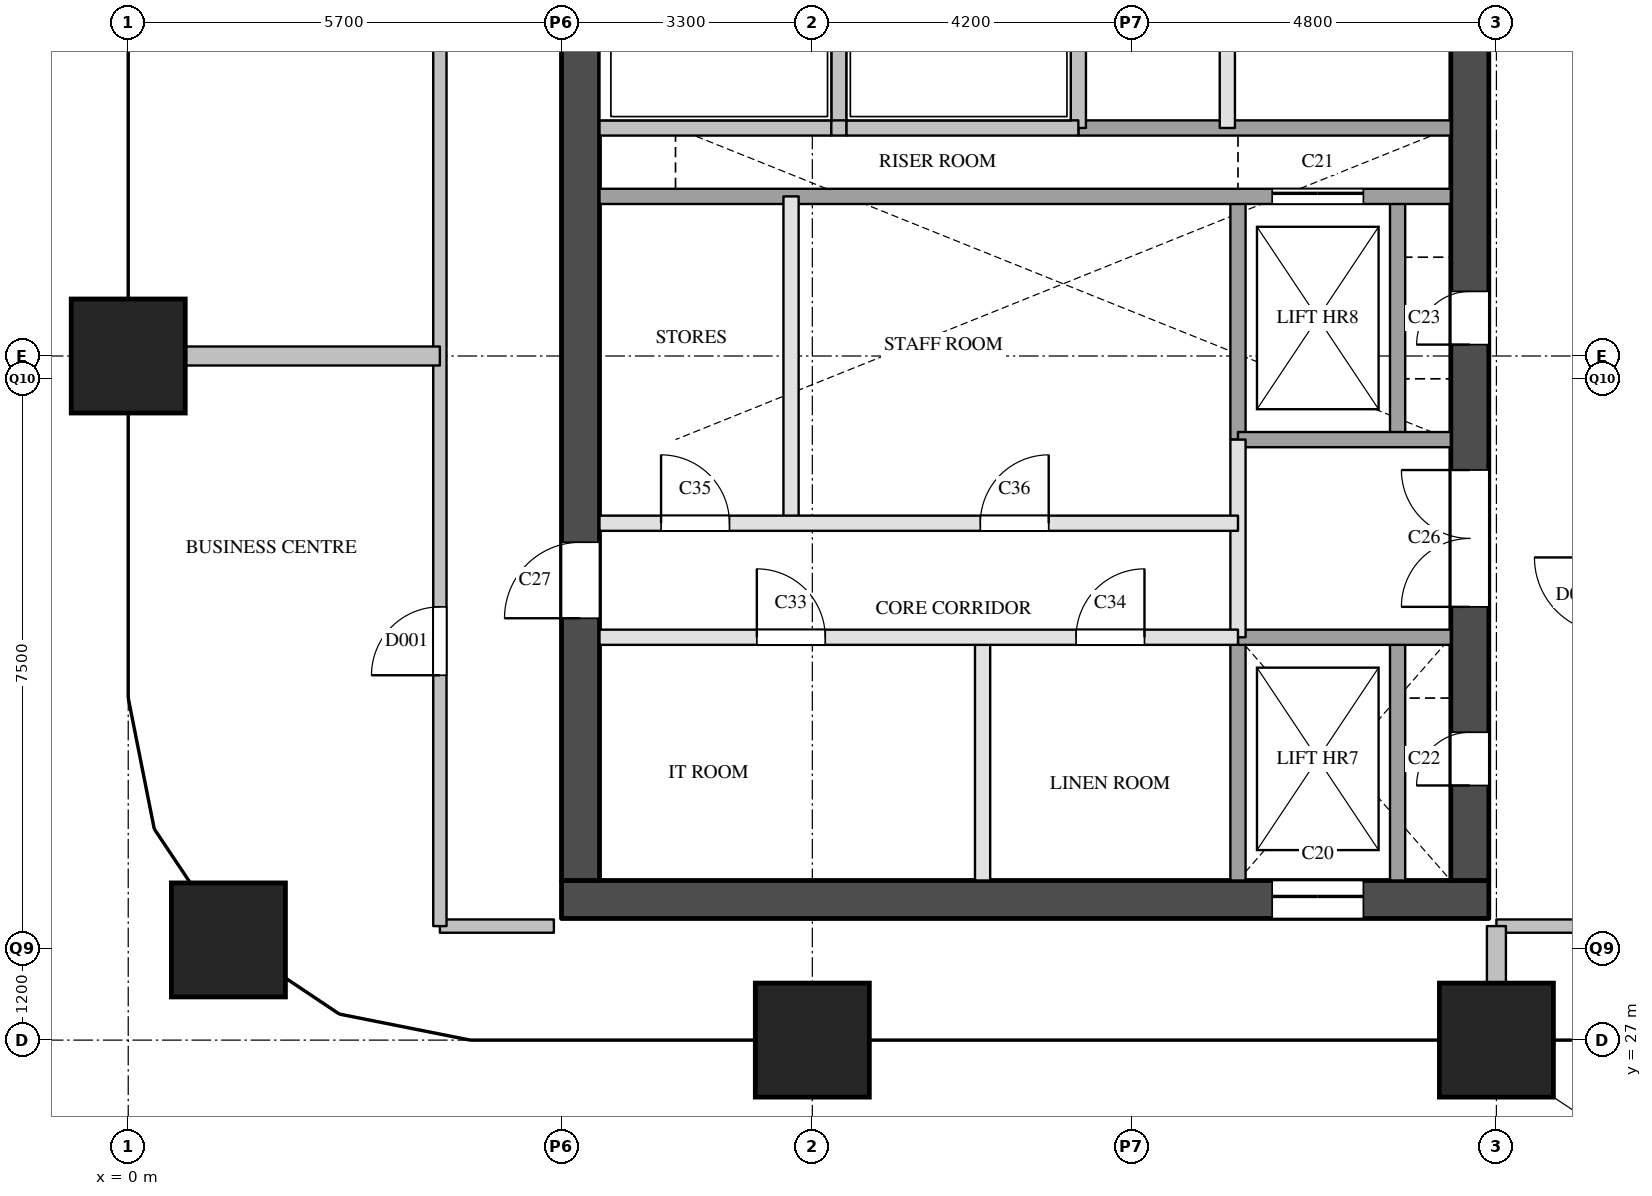
"""IFC4 building model, lengths in metres.
Left out: names, types, materials, properties, quantities, classifications, styles, units other than length and angle.
Written with IfcOpenShell. Run it as: python <this file> out.ifc"""

import sys

from ifc_helpers import new_model, si_unit, direction, frame, frame_2d, origin, origin_2d, place, context, subcontext, project, spatial, rectangle, extrude, element, fill, save


model = new_model("IFC4")
c1 = context("Model", 3, precision=1e-05, world=origin(), true_north=direction((0.0, 1.0)))
c2 = subcontext(c1, "Body", "Model", "MODEL_VIEW")
j1 = project(units=[si_unit("LENGTHUNIT", "METRE"), si_unit("PLANEANGLEUNIT", "RADIAN")], contexts=[c1])
p1 = place(None, origin())
s1 = spatial("IfcSite", under=j1, at=p1, CompositionType="ELEMENT")
p2 = place(p1, origin())
s2 = spatial("IfcBuilding", under=s1, at=p2, CompositionType="ELEMENT")
p3 = place(p2, frame((0.0, 0.0, 146.6)))
s3 = spatial("IfcBuildingStorey", under=s2, at=p3, CompositionType="ELEMENT", Elevation=146.6)
for number, where, z_axis, x_axis in (
    (1, (1.318, 28.318, 0.0), (0.0, 0.0, 1.0), (1.0, 0.0, 0.0)),
    (2, (0.0, 36.0, 0.0), (0.0, 0.0, 1.0), (1.0, 0.0, 0.0)),
    (3, (9.0, 27.0, 0.0), (0.0, 0.0, 1.0), (1.0, 0.0, 0.0)),
    (4, (18.0, 27.0, 0.0), (0.0, 0.0, 1.0), (1.0, 0.0, 0.0)),
):
    element("IfcColumn", number, at=place(p3, frame(where, z_axis=z_axis, x_axis=x_axis)), inside=s3, PredefinedType="COLUMN", context=c2, shape_type="SweptSolid", body=[
        extrude(rectangle(XDim=1.5, YDim=1.5, at=origin_2d()), origin(), (0.0, 0.0, 1.0), 3.9),
    ])
p4 = place(p3, frame((5.7, 28.85, 0.0), z_axis=(0.0, 0.0, 1.0), x_axis=(1.0, 0.0, 0.0)))
e5 = element("IfcWall", 5, at=p4, inside=s3, PredefinedType="SHEAR", context=c2, shape_type="SweptSolid", body=[
    extrude(rectangle(XDim=12.2, YDim=0.5, at=frame_2d((6.1, 0.0))), origin(), (0.0, 0.0, 1.0), 3.6),
])
p5 = place(p4, frame((9.35, 0.0, 0.0)))
e6 = element("IfcOpeningElement", 6, at=p5, cuts=e5, PredefinedType="OPENING", context=c2, shape_type="SweptSolid", body=[
    extrude(rectangle(XDim=1.2, YDim=2.1, at=frame_2d((0.6, 1.05))), frame((0.0, 0.26, 0.0), z_axis=(0.0, -1.0, 0.0), x_axis=(1.0, 0.0, 0.0)), (0.0, 0.0, 1.0), 0.52),
])
p6 = place(p3, frame((5.95, 29.1, 0.0), z_axis=(0.0, 0.0, 1.0), x_axis=(0.0, 1.0, 0.0)))
e7 = element("IfcWall", 7, at=p6, inside=s3, PredefinedType="SHEAR", context=c2, shape_type="SweptSolid", body=[
    extrude(rectangle(XDim=20.3, YDim=0.5, at=frame_2d((10.15, 0.0))), origin(), (0.0, 0.0, 1.0), 3.6),
])
p7 = place(p6, frame((3.45, 0.0, 0.0)))
e8 = element("IfcOpeningElement", 8, at=p7, cuts=e7, PredefinedType="OPENING", context=c2, shape_type="SweptSolid", body=[
    extrude(rectangle(XDim=1.0, YDim=2.1, at=frame_2d((0.5, 1.05))), frame((0.0, 0.26, 0.0), z_axis=(0.0, -1.0, 0.0), x_axis=(1.0, 0.0, 0.0)), (0.0, 0.0, 1.0), 0.52),
])
p8 = place(p6, frame((16.4, 0.0, 0.0)))
e9 = element("IfcOpeningElement", 9, at=p8, cuts=e7, PredefinedType="OPENING", context=c2, shape_type="SweptSolid", body=[
    extrude(rectangle(XDim=1.0, YDim=2.1, at=frame_2d((0.5, 1.05))), frame((0.0, 0.26, 0.0), z_axis=(0.0, -1.0, 0.0), x_axis=(1.0, 0.0, 0.0)), (0.0, 0.0, 1.0), 0.52),
])
p9 = place(p3, frame((17.65, 29.1, 0.0), z_axis=(0.0, 0.0, 1.0), x_axis=(0.0, 1.0, 0.0)))
e10 = element("IfcWall", 10, at=p9, inside=s3, PredefinedType="SHEAR", context=c2, shape_type="SweptSolid", body=[
    extrude(rectangle(XDim=20.3, YDim=0.5, at=frame_2d((10.15, 0.0))), origin(), (0.0, 0.0, 1.0), 3.6),
])
p10 = place(p9, frame((1.25, 0.0, 0.0)))
e11 = element("IfcOpeningElement", 11, at=p10, cuts=e10, PredefinedType="OPENING", context=c2, shape_type="SweptSolid", body=[
    extrude(rectangle(XDim=0.7, YDim=2.1, at=frame_2d((0.35, 1.05))), frame((0.0, 0.26, 0.0), z_axis=(0.0, -1.0, 0.0), x_axis=(1.0, 0.0, 0.0)), (0.0, 0.0, 1.0), 0.52),
])
p11 = place(p9, frame((7.05, 0.0, 0.0)))
e12 = element("IfcOpeningElement", 12, at=p11, cuts=e10, PredefinedType="OPENING", context=c2, shape_type="SweptSolid", body=[
    extrude(rectangle(XDim=0.7, YDim=2.1, at=frame_2d((0.35, 1.05))), frame((0.0, 0.26, 0.0), z_axis=(0.0, -1.0, 0.0), x_axis=(1.0, 0.0, 0.0)), (0.0, 0.0, 1.0), 0.52),
])
p12 = place(p9, frame((3.6, 0.0, 0.0)))
e13 = element("IfcOpeningElement", 13, at=p12, cuts=e10, PredefinedType="OPENING", context=c2, shape_type="SweptSolid", body=[
    extrude(rectangle(XDim=1.8, YDim=2.1, at=frame_2d((0.9, 1.05))), frame((0.0, 0.26, 0.0), z_axis=(0.0, -1.0, 0.0), x_axis=(1.0, 0.0, 0.0)), (0.0, 0.0, 1.0), 0.52),
])
p13 = place(p3, frame((8.72, 33.8, 0.0), z_axis=(0.0, 0.0, 1.0), x_axis=(0.0, 1.0, 0.0)))
e14 = element("IfcWall", 14, at=p13, inside=s3, PredefinedType="PARTITIONING", context=c2, shape_type="SweptSolid", body=[
    extrude(rectangle(XDim=4.3, YDim=0.2, at=frame_2d((2.15, 0.0))), origin(), (0.0, 0.0, 1.0), 3.6),
])
p14 = place(p3, frame((9.35, 39.0, 0.0), z_axis=(0.0, 0.0, 1.0), x_axis=(0.0, 1.0, 0.0)))
e15 = element("IfcWall", 15, at=p14, inside=s3, PredefinedType="SOLIDWALL", context=c2, shape_type="SweptSolid", body=[
    extrude(rectangle(XDim=1.9, YDim=0.2, at=frame_2d((0.95, 0.0))), origin(), (0.0, 0.0, 1.0), 3.6),
])
p15 = place(p3, frame((11.24, 29.1, 0.0), z_axis=(0.0, 0.0, 1.0), x_axis=(0.0, 1.0, 0.0)))
e16 = element("IfcWall", 16, at=p15, inside=s3, PredefinedType="PARTITIONING", context=c2, shape_type="SweptSolid", body=[
    extrude(rectangle(XDim=3.2, YDim=0.2, at=frame_2d((1.6, 0.0))), origin(), (0.0, 0.0, 1.0), 3.6),
])
p16 = place(p3, frame((12.5, 39.0, 0.0), z_axis=(0.0, 0.0, 1.0), x_axis=(0.0, 1.0, 0.0)))
e17 = element("IfcWall", 17, at=p16, inside=s3, PredefinedType="SOLIDWALL", context=c2, shape_type="SweptSolid", body=[
    extrude(rectangle(XDim=1.9, YDim=0.2, at=frame_2d((0.95, 0.0))), origin(), (0.0, 0.0, 1.0), 3.6),
])
p17 = place(p3, frame((14.46, 39.0, 0.0), z_axis=(0.0, 0.0, 1.0), x_axis=(0.0, 1.0, 0.0)))
e18 = element("IfcWall", 18, at=p17, inside=s3, PredefinedType="PARTITIONING", context=c2, shape_type="SweptSolid", body=[
    extrude(rectangle(XDim=6.2, YDim=0.2, at=frame_2d((3.1, 0.0))), origin(), (0.0, 0.0, 1.0), 3.6),
])
p18 = place(p3, frame((14.6, 32.3, 0.0), z_axis=(0.0, 0.0, 1.0), x_axis=(0.0, 1.0, 0.0)))
e19 = element("IfcWall", 19, at=p18, inside=s3, PredefinedType="PARTITIONING", context=c2, shape_type="SweptSolid", body=[
    extrude(rectangle(XDim=2.6, YDim=0.2, at=frame_2d((1.3, 0.0))), origin(), (0.0, 0.0, 1.0), 3.6),
])
p19 = place(p3, frame((14.6, 29.1, 0.0), z_axis=(0.0, 0.0, 1.0), x_axis=(0.0, 1.0, 0.0)))
e20 = element("IfcWall", 20, at=p19, inside=s3, PredefinedType="SOLIDWALL", context=c2, shape_type="SweptSolid", body=[
    extrude(rectangle(XDim=3.2, YDim=0.2, at=frame_2d((1.6, 0.0))), origin(), (0.0, 0.0, 1.0), 3.6),
])
p20 = place(p3, frame((14.6, 34.9, 0.0), z_axis=(0.0, 0.0, 1.0), x_axis=(0.0, 1.0, 0.0)))
e21 = element("IfcWall", 21, at=p20, inside=s3, PredefinedType="SOLIDWALL", context=c2, shape_type="SweptSolid", body=[
    extrude(rectangle(XDim=3.2, YDim=0.2, at=frame_2d((1.6, 0.0))), origin(), (0.0, 0.0, 1.0), 3.6),
])
p21 = place(p3, frame((16.7, 29.1, 0.0), z_axis=(0.0, 0.0, 1.0), x_axis=(0.0, 1.0, 0.0)))
e22 = element("IfcWall", 22, at=p21, inside=s3, PredefinedType="SOLIDWALL", context=c2, shape_type="SweptSolid", body=[
    extrude(rectangle(XDim=3.2, YDim=0.2, at=frame_2d((1.6, 0.0))), origin(), (0.0, 0.0, 1.0), 3.6),
])
p22 = place(p3, frame((16.7, 34.9, 0.0), z_axis=(0.0, 0.0, 1.0), x_axis=(0.0, 1.0, 0.0)))
e23 = element("IfcWall", 23, at=p22, inside=s3, PredefinedType="SOLIDWALL", context=c2, shape_type="SweptSolid", body=[
    extrude(rectangle(XDim=3.2, YDim=0.2, at=frame_2d((1.6, 0.0))), origin(), (0.0, 0.0, 1.0), 3.6),
])
p23 = place(p3, frame((6.2, 32.3, 0.0), z_axis=(0.0, 0.0, 1.0), x_axis=(1.0, 0.0, 0.0)))
e24 = element("IfcWall", 24, at=p23, inside=s3, PredefinedType="PARTITIONING", context=c2, shape_type="SweptSolid", body=[
    extrude(rectangle(XDim=8.4, YDim=0.2, at=frame_2d((4.2, 0.0))), origin(), (0.0, 0.0, 1.0), 3.6),
])
p24 = place(p23, frame((2.07, 0.0, 0.0)))
e25 = element("IfcOpeningElement", 25, at=p24, cuts=e24, PredefinedType="OPENING", context=c2, shape_type="SweptSolid", body=[
    extrude(rectangle(XDim=0.9, YDim=2.1, at=frame_2d((0.45, 1.05))), frame((0.0, 0.11, 0.0), z_axis=(0.0, -1.0, 0.0), x_axis=(1.0, 0.0, 0.0)), (0.0, 0.0, 1.0), 0.22),
])
p25 = place(p23, frame((6.27, 0.0, 0.0)))
e26 = element("IfcOpeningElement", 26, at=p25, cuts=e24, PredefinedType="OPENING", context=c2, shape_type="SweptSolid", body=[
    extrude(rectangle(XDim=0.9, YDim=2.1, at=frame_2d((0.45, 1.05))), frame((0.0, 0.11, 0.0), z_axis=(0.0, -1.0, 0.0), x_axis=(1.0, 0.0, 0.0)), (0.0, 0.0, 1.0), 0.22),
])
p26 = place(p3, frame((14.6, 32.3, 0.0), z_axis=(0.0, 0.0, 1.0), x_axis=(1.0, 0.0, 0.0)))
e27 = element("IfcWall", 27, at=p26, inside=s3, PredefinedType="SOLIDWALL", context=c2, shape_type="SweptSolid", body=[
    extrude(rectangle(XDim=2.8, YDim=0.2, at=frame_2d((1.4, 0.0))), origin(), (0.0, 0.0, 1.0), 3.6),
])
p27 = place(p3, frame((6.2, 33.8, 0.0), z_axis=(0.0, 0.0, 1.0), x_axis=(1.0, 0.0, 0.0)))
e28 = element("IfcWall", 28, at=p27, inside=s3, PredefinedType="PARTITIONING", context=c2, shape_type="SweptSolid", body=[
    extrude(rectangle(XDim=8.4, YDim=0.2, at=frame_2d((4.2, 0.0))), origin(), (0.0, 0.0, 1.0), 3.6),
])
p28 = place(p27, frame((0.81, 0.0, 0.0)))
e29 = element("IfcOpeningElement", 29, at=p28, cuts=e28, PredefinedType="OPENING", context=c2, shape_type="SweptSolid", body=[
    extrude(rectangle(XDim=0.9, YDim=2.1, at=frame_2d((0.45, 1.05))), frame((0.0, 0.11, 0.0), z_axis=(0.0, -1.0, 0.0), x_axis=(1.0, 0.0, 0.0)), (0.0, 0.0, 1.0), 0.22),
])
p29 = place(p27, frame((5.01, 0.0, 0.0)))
e30 = element("IfcOpeningElement", 30, at=p29, cuts=e28, PredefinedType="OPENING", context=c2, shape_type="SweptSolid", body=[
    extrude(rectangle(XDim=0.9, YDim=2.1, at=frame_2d((0.45, 1.05))), frame((0.0, 0.11, 0.0), z_axis=(0.0, -1.0, 0.0), x_axis=(1.0, 0.0, 0.0)), (0.0, 0.0, 1.0), 0.22),
])
p30 = place(p3, frame((14.6, 34.9, 0.0), z_axis=(0.0, 0.0, 1.0), x_axis=(1.0, 0.0, 0.0)))
e31 = element("IfcWall", 31, at=p30, inside=s3, PredefinedType="SOLIDWALL", context=c2, shape_type="SweptSolid", body=[
    extrude(rectangle(XDim=2.8, YDim=0.2, at=frame_2d((1.4, 0.0))), origin(), (0.0, 0.0, 1.0), 3.6),
])
p31 = place(p3, frame((6.2, 38.1, 0.0), z_axis=(0.0, 0.0, 1.0), x_axis=(1.0, 0.0, 0.0)))
e32 = element("IfcWall", 32, at=p31, inside=s3, PredefinedType="SOLIDWALL", context=c2, shape_type="SweptSolid", body=[
    extrude(rectangle(XDim=11.2, YDim=0.2, at=frame_2d((5.6, 0.0))), origin(), (0.0, 0.0, 1.0), 3.6),
])
p32 = place(p31, frame((8.85, 0.0, 0.0)))
e33 = element("IfcOpeningElement", 33, at=p32, cuts=e32, PredefinedType="OPENING", context=c2, shape_type="SweptSolid", body=[
    extrude(rectangle(XDim=1.2, YDim=2.1, at=frame_2d((0.6, 1.05))), frame((0.0, 0.11, 0.0), z_axis=(0.0, -1.0, 0.0), x_axis=(1.0, 0.0, 0.0)), (0.0, 0.0, 1.0), 0.22),
])
p33 = place(p3, frame((12.5, 39.0, 0.0), z_axis=(0.0, 0.0, 1.0), x_axis=(1.0, 0.0, 0.0)))
e34 = element("IfcWall", 34, at=p33, inside=s3, PredefinedType="SOLIDWALL", context=c2, shape_type="SweptSolid", body=[
    extrude(rectangle(XDim=4.9, YDim=0.2, at=frame_2d((2.45, 0.0))), origin(), (0.0, 0.0, 1.0), 3.6),
])
p34 = place(p3, frame((6.2, 39.0, 0.0), z_axis=(0.0, 0.0, 1.0), x_axis=(1.0, 0.0, 0.0)))
e35 = element("IfcWall", 35, at=p34, inside=s3, PredefinedType="SOLIDWALL", context=c2, shape_type="SweptSolid", body=[
    extrude(rectangle(XDim=3.05, YDim=0.2, at=frame_2d((1.525, 0.0))), origin(), (0.0, 0.0, 1.0), 3.6),
])
p35 = place(p3, frame((9.25, 39.0, 0.0), z_axis=(0.0, 0.0, 1.0), x_axis=(1.0, 0.0, 0.0)))
e36 = element("IfcWall", 36, at=p35, inside=s3, PredefinedType="SOLIDWALL", context=c2, shape_type="SweptSolid", body=[
    extrude(rectangle(XDim=0.2, YDim=0.2, at=frame_2d((0.1, 0.0))), origin(), (0.0, 0.0, 1.0), 3.6),
])
p36 = place(p3, frame((9.45, 39.0, 0.0), z_axis=(0.0, 0.0, 1.0), x_axis=(1.0, 0.0, 0.0)))
e37 = element("IfcWall", 37, at=p36, inside=s3, PredefinedType="SOLIDWALL", context=c2, shape_type="SweptSolid", body=[
    extrude(rectangle(XDim=3.05, YDim=0.2, at=frame_2d((1.525, 0.0))), origin(), (0.0, 0.0, 1.0), 3.6),
])
for number, where, z_axis, x_axis in (
    (38, (4.1, 28.5, 0.0), (0.0, 0.0, 1.0), (1.0, 0.0, 0.0)),
    (39, (18.0, 28.5, 0.0), (0.0, 0.0, 1.0), (1.0, 0.0, 0.0)),
):
    element("IfcWall", number, at=place(p3, frame(where, z_axis=z_axis, x_axis=x_axis)), inside=s3, PredefinedType="PARTITIONING", context=c2, shape_type="SweptSolid", body=[
        extrude(rectangle(XDim=1.5, YDim=0.175, at=frame_2d((0.75, 0.0))), origin(), (0.0, 0.0, 1.0), 3.6),
    ])
p37 = place(p3, frame((4.1, 28.5, 0.0), z_axis=(0.0, 0.0, 1.0), x_axis=(0.0, 1.0, 0.0)))
e40 = element("IfcWall", 40, at=p37, inside=s3, PredefinedType="PARTITIONING", context=c2, shape_type="SweptSolid", body=[
    extrude(rectangle(XDim=23.0, YDim=0.175, at=frame_2d((11.5, 0.0))), origin(), (0.0, 0.0, 1.0), 3.6),
])
p38 = place(p37, frame((3.3, 0.0, 0.0)))
e41 = element("IfcOpeningElement", 41, at=p38, cuts=e40, PredefinedType="OPENING", context=c2, shape_type="SweptSolid", body=[
    extrude(rectangle(XDim=0.9, YDim=2.1, at=frame_2d((0.45, 1.05))), frame((0.0, 0.097, 0.0), z_axis=(0.0, -1.0, 0.0), x_axis=(1.0, 0.0, 0.0)), (0.0, 0.0, 1.0), 0.195),
])
p39 = place(p37, frame((14.8, 0.0, 0.0)))
e42 = element("IfcOpeningElement", 42, at=p39, cuts=e40, PredefinedType="OPENING", context=c2, shape_type="SweptSolid", body=[
    extrude(rectangle(XDim=0.9, YDim=2.1, at=frame_2d((0.45, 1.05))), frame((0.0, 0.097, 0.0), z_axis=(0.0, -1.0, 0.0), x_axis=(1.0, 0.0, 0.0)), (0.0, 0.0, 1.0), 0.195),
])
p40 = place(p3, frame((0.0, 36.0, 0.0), z_axis=(0.0, 0.0, 1.0), x_axis=(1.0, 0.0, 0.0)))
e43 = element("IfcWall", 43, at=p40, inside=s3, PredefinedType="PARTITIONING", context=c2, shape_type="SweptSolid", body=[
    extrude(rectangle(XDim=4.1, YDim=0.25, at=frame_2d((2.05, 0.0))), origin(), (0.0, 0.0, 1.0), 3.6),
])
p41 = place(p3, frame((18.0, 27.0, 0.0), z_axis=(0.0, 0.0, 1.0), x_axis=(0.0, 1.0, 0.0)))
e44 = element("IfcWall", 44, at=p41, inside=s3, PredefinedType="PARTITIONING", context=c2, shape_type="SweptSolid", body=[
    extrude(rectangle(XDim=1.5, YDim=0.25, at=frame_2d((0.75, 0.0))), origin(), (0.0, 0.0, 1.0), 3.6),
])
p42 = place(p5, origin())
e45 = element("IfcDoor", 45, at=p42, inside=s3, OperationType="SLIDING_TO_LEFT", PredefinedType="DOOR", context=c2, shape_type="SweptSolid", body=[
    extrude(rectangle(XDim=1.2, YDim=2.1, at=frame_2d((0.6, 1.05))), frame((0.0, 0.025, 0.0), z_axis=(0.0, -1.0, 0.0), x_axis=(1.0, 0.0, 0.0)), (0.0, 0.0, 1.0), 0.05),
])
fill(e6, e45)
p43 = place(p32, origin())
e46 = element("IfcDoor", 46, at=p43, inside=s3, OperationType="SLIDING_TO_LEFT", PredefinedType="DOOR", context=c2, shape_type="SweptSolid", body=[
    extrude(rectangle(XDim=1.2, YDim=2.1, at=frame_2d((0.6, 1.05))), frame((0.0, 0.025, 0.0), z_axis=(0.0, -1.0, 0.0), x_axis=(1.0, 0.0, 0.0)), (0.0, 0.0, 1.0), 0.05),
])
fill(e33, e46)
p44 = place(p10, origin())
e47 = element("IfcDoor", 47, at=p44, inside=s3, OperationType="SINGLE_SWING_LEFT", PredefinedType="DOOR", context=c2, shape_type="SweptSolid", body=[
    extrude(rectangle(XDim=0.7, YDim=2.1, at=frame_2d((0.35, 1.05))), frame((0.0, 0.025, 0.0), z_axis=(0.0, -1.0, 0.0), x_axis=(1.0, 0.0, 0.0)), (0.0, 0.0, 1.0), 0.05),
])
fill(e11, e47)
p45 = place(p11, origin())
e48 = element("IfcDoor", 48, at=p45, inside=s3, OperationType="SINGLE_SWING_LEFT", PredefinedType="DOOR", context=c2, shape_type="SweptSolid", body=[
    extrude(rectangle(XDim=0.7, YDim=2.1, at=frame_2d((0.35, 1.05))), frame((0.0, 0.025, 0.0), z_axis=(0.0, -1.0, 0.0), x_axis=(1.0, 0.0, 0.0)), (0.0, 0.0, 1.0), 0.05),
])
fill(e12, e48)
p46 = place(p12, origin())
e49 = element("IfcDoor", 49, at=p46, inside=s3, OperationType="DOUBLE_DOOR_SINGLE_SWING", PredefinedType="DOOR", context=c2, shape_type="SweptSolid", body=[
    extrude(rectangle(XDim=1.8, YDim=2.1, at=frame_2d((0.9, 1.05))), frame((0.0, 0.025, 0.0), z_axis=(0.0, -1.0, 0.0), x_axis=(1.0, 0.0, 0.0)), (0.0, 0.0, 1.0), 0.05),
])
fill(e13, e49)
p47 = place(p7, origin())
e50 = element("IfcDoor", 50, at=p47, inside=s3, OperationType="SINGLE_SWING_LEFT", PredefinedType="DOOR", context=c2, shape_type="SweptSolid", body=[
    extrude(rectangle(XDim=1.0, YDim=2.1, at=frame_2d((0.5, 1.05))), frame((0.0, 0.025, 0.0), z_axis=(0.0, -1.0, 0.0), x_axis=(1.0, 0.0, 0.0)), (0.0, 0.0, 1.0), 0.05),
])
fill(e8, e50)
p48 = place(p24, origin())
e51 = element("IfcDoor", 51, at=p48, inside=s3, OperationType="SINGLE_SWING_LEFT", PredefinedType="DOOR", context=c2, shape_type="SweptSolid", body=[
    extrude(rectangle(XDim=0.9, YDim=2.1, at=frame_2d((0.45, 1.05))), frame((0.0, 0.025, 0.0), z_axis=(0.0, -1.0, 0.0), x_axis=(1.0, 0.0, 0.0)), (0.0, 0.0, 1.0), 0.05),
])
fill(e25, e51)
p49 = place(p25, origin())
e52 = element("IfcDoor", 52, at=p49, inside=s3, OperationType="SINGLE_SWING_RIGHT", PredefinedType="DOOR", context=c2, shape_type="SweptSolid", body=[
    extrude(rectangle(XDim=0.9, YDim=2.1, at=frame_2d((0.45, 1.05))), frame((0.0, 0.025, 0.0), z_axis=(0.0, -1.0, 0.0), x_axis=(1.0, 0.0, 0.0)), (0.0, 0.0, 1.0), 0.05),
])
fill(e26, e52)
p50 = place(p28, origin())
e53 = element("IfcDoor", 53, at=p50, inside=s3, OperationType="SINGLE_SWING_LEFT", PredefinedType="DOOR", context=c2, shape_type="SweptSolid", body=[
    extrude(rectangle(XDim=0.9, YDim=2.1, at=frame_2d((0.45, 1.05))), frame((0.0, 0.025, 0.0), z_axis=(0.0, -1.0, 0.0), x_axis=(1.0, 0.0, 0.0)), (0.0, 0.0, 1.0), 0.05),
])
fill(e29, e53)
p51 = place(p29, origin())
e54 = element("IfcDoor", 54, at=p51, inside=s3, OperationType="SINGLE_SWING_RIGHT", PredefinedType="DOOR", context=c2, shape_type="SweptSolid", body=[
    extrude(rectangle(XDim=0.9, YDim=2.1, at=frame_2d((0.45, 1.05))), frame((0.0, 0.025, 0.0), z_axis=(0.0, -1.0, 0.0), x_axis=(1.0, 0.0, 0.0)), (0.0, 0.0, 1.0), 0.05),
])
fill(e30, e54)
p52 = place(p38, origin())
e55 = element("IfcDoor", 55, at=p52, inside=s3, OperationType="SINGLE_SWING_LEFT", PredefinedType="DOOR", context=c2, shape_type="SweptSolid", body=[
    extrude(rectangle(XDim=0.9, YDim=2.1, at=frame_2d((0.45, 1.05))), frame((0.0, 0.025, 0.0), z_axis=(0.0, -1.0, 0.0), x_axis=(1.0, 0.0, 0.0)), (0.0, 0.0, 1.0), 0.05),
])
fill(e41, e55)
save(model, sys.argv[1])
